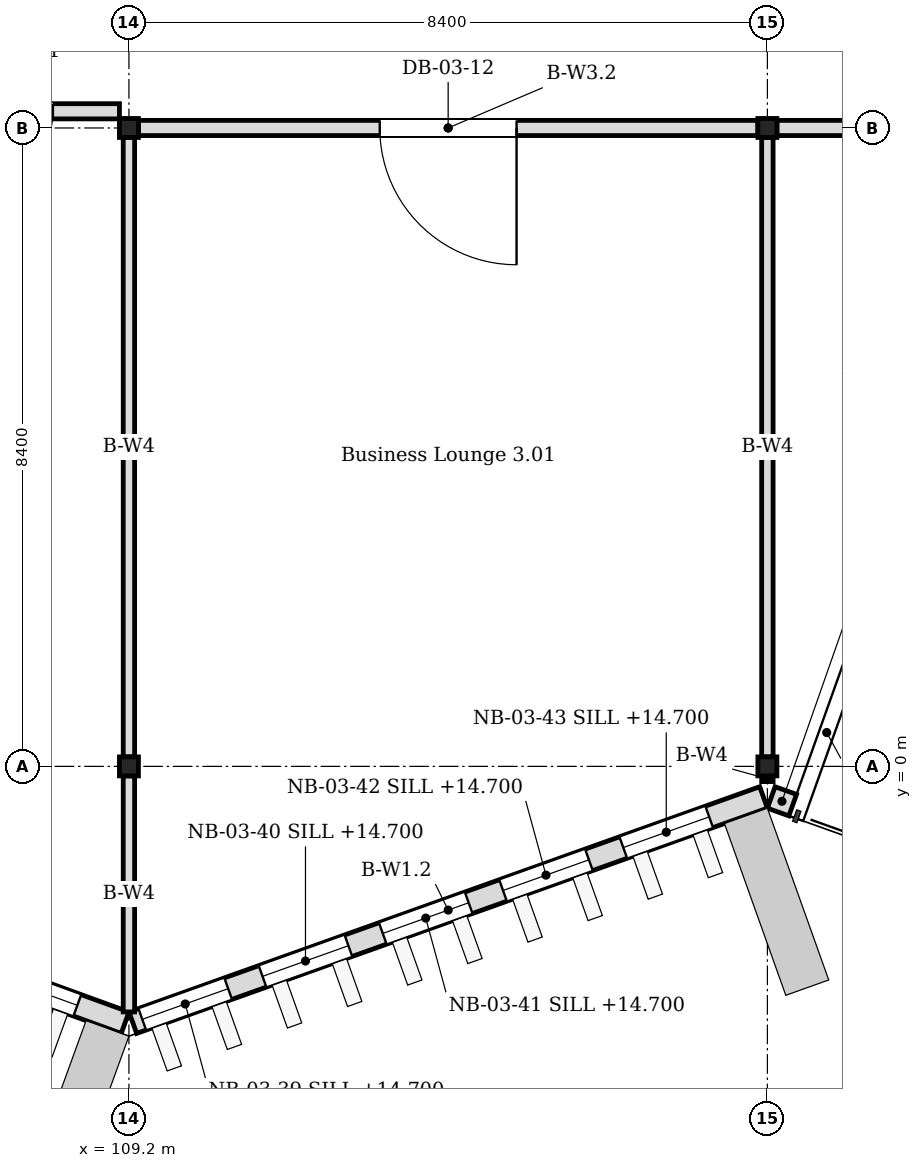
"""IFC4 building model, lengths in metres.
Left out: names, types, materials, properties, quantities, classifications, styles, units other than length and angle.
Written with IfcOpenShell. Run it as: python <this file> out.ifc"""

import sys

from ifc_helpers import new_model, si_unit, direction, frame, frame_2d, origin, origin_2d, place, context, subcontext, project, spatial, rectangle, i_section, extrude, element, fill, save


model = new_model("IFC4")
c1 = context("Model", 3, precision=1e-05, world=origin(), true_north=direction((0.0, 1.0)))
c2 = subcontext(c1, "Body", "Model", "MODEL_VIEW")
j1 = project(units=[si_unit("LENGTHUNIT", "METRE"), si_unit("PLANEANGLEUNIT", "RADIAN")], contexts=[c1])
p1 = place(None, origin())
s1 = spatial("IfcSite", under=j1, at=p1, CompositionType="ELEMENT")
p2 = place(p1, origin())
s2 = spatial("IfcBuilding", under=s1, at=p2, CompositionType="ELEMENT")
p3 = place(p2, frame((0.0, 0.0, 14.4)))
s3 = spatial("IfcBuildingStorey", under=s2, at=p3, CompositionType="ELEMENT", Elevation=14.4)
for number, where, z_axis, x_axis in (
    (1, (109.2, 0.0, 0.0), (0.0, 0.0, 1.0), (1.0, 0.0, 0.0)),
    (2, (109.2, 8.4, 0.0), (0.0, 0.0, 1.0), (1.0, 0.0, 0.0)),
    (3, (117.6, 0.0, 0.0), (0.0, 0.0, 1.0), (1.0, 0.0, 0.0)),
    (4, (117.6, 8.4, 0.0), (0.0, 0.0, 1.0), (1.0, 0.0, 0.0)),
):
    element("IfcColumn", number, at=place(p3, frame(where, z_axis=z_axis, x_axis=x_axis)), inside=s3, PredefinedType="COLUMN", context=c2, shape_type="SweptSolid", body=[
        extrude(i_section(OverallWidth=0.25, OverallDepth=0.25, WebThickness=0.009, FlangeThickness=0.014, FilletRadius=0.013, at=origin_2d()), origin(), (0.0, 0.0, 1.0), 3.95),
    ])
p4 = place(p3, frame((100.851, -0.359, 0.0), z_axis=(0.0, 0.0, 1.0), x_axis=(0.939953187971, -0.341303390584, 0.0)))
e5 = element("IfcWall", 5, at=p4, inside=s3, PredefinedType="SOLIDWALL", context=c2, shape_type="SweptSolid", body=[
    extrude(rectangle(XDim=8.828, YDim=0.3, at=frame_2d((4.414, 0.0))), origin(), (0.0, 0.0, 1.0), 3.95),
])
p5 = place(p4, frame((0.24, 0.0, 0.3)))
e6 = element("IfcOpeningElement", 6, at=p5, cuts=e5, PredefinedType="OPENING", context=c2, shape_type="SweptSolid", body=[
    extrude(rectangle(XDim=1.2, YDim=3.3, at=frame_2d((0.6, 1.65))), frame((0.0, 0.16, 0.0), z_axis=(0.0, -1.0, 0.0), x_axis=(1.0, 0.0, 0.0)), (0.0, 0.0, 1.0), 0.32),
])
p6 = place(p4, frame((1.92, 0.0, 0.3)))
e7 = element("IfcOpeningElement", 7, at=p6, cuts=e5, PredefinedType="OPENING", context=c2, shape_type="SweptSolid", body=[
    extrude(rectangle(XDim=1.2, YDim=3.3, at=frame_2d((0.6, 1.65))), frame((0.0, 0.16, 0.0), z_axis=(0.0, -1.0, 0.0), x_axis=(1.0, 0.0, 0.0)), (0.0, 0.0, 1.0), 0.32),
])
p7 = place(p4, frame((3.6, 0.0, 0.3)))
e8 = element("IfcOpeningElement", 8, at=p7, cuts=e5, PredefinedType="OPENING", context=c2, shape_type="SweptSolid", body=[
    extrude(rectangle(XDim=1.2, YDim=3.3, at=frame_2d((0.6, 1.65))), frame((0.0, 0.16, 0.0), z_axis=(0.0, -1.0, 0.0), x_axis=(1.0, 0.0, 0.0)), (0.0, 0.0, 1.0), 0.32),
])
p8 = place(p4, frame((5.28, 0.0, 0.3)))
e9 = element("IfcOpeningElement", 9, at=p8, cuts=e5, PredefinedType="OPENING", context=c2, shape_type="SweptSolid", body=[
    extrude(rectangle(XDim=1.2, YDim=3.3, at=frame_2d((0.6, 1.65))), frame((0.0, 0.16, 0.0), z_axis=(0.0, -1.0, 0.0), x_axis=(1.0, 0.0, 0.0)), (0.0, 0.0, 1.0), 0.32),
])
p9 = place(p4, frame((6.96, 0.0, 0.3)))
e10 = element("IfcOpeningElement", 10, at=p9, cuts=e5, PredefinedType="OPENING", context=c2, shape_type="SweptSolid", body=[
    extrude(rectangle(XDim=1.2, YDim=3.3, at=frame_2d((0.6, 1.65))), frame((0.0, 0.16, 0.0), z_axis=(0.0, -1.0, 0.0), x_axis=(1.0, 0.0, 0.0)), (0.0, 0.0, 1.0), 0.32),
])
p10 = place(p3, frame((109.251, -3.372, 0.0), z_axis=(0.0, 0.0, 1.0), x_axis=(0.941744418946, 0.336329376334, 0.0)))
e11 = element("IfcWall", 11, at=p10, inside=s3, PredefinedType="SOLIDWALL", context=c2, shape_type="SweptSolid", body=[
    extrude(rectangle(XDim=8.812, YDim=0.3, at=frame_2d((4.406, 0.0))), origin(), (0.0, 0.0, 1.0), 3.95),
])
p11 = place(p10, frame((0.132, 0.0, 0.3)))
e12 = element("IfcOpeningElement", 12, at=p11, cuts=e11, PredefinedType="OPENING", context=c2, shape_type="SweptSolid", body=[
    extrude(rectangle(XDim=1.2, YDim=3.3, at=frame_2d((0.6, 1.65))), frame((0.0, 0.16, 0.0), z_axis=(0.0, -1.0, 0.0), x_axis=(1.0, 0.0, 0.0)), (0.0, 0.0, 1.0), 0.32),
])
p12 = place(p10, frame((1.812, 0.0, 0.3)))
e13 = element("IfcOpeningElement", 13, at=p12, cuts=e11, PredefinedType="OPENING", context=c2, shape_type="SweptSolid", body=[
    extrude(rectangle(XDim=1.2, YDim=3.3, at=frame_2d((0.6, 1.65))), frame((0.0, 0.16, 0.0), z_axis=(0.0, -1.0, 0.0), x_axis=(1.0, 0.0, 0.0)), (0.0, 0.0, 1.0), 0.32),
])
p13 = place(p10, frame((3.492, 0.0, 0.3)))
e14 = element("IfcOpeningElement", 14, at=p13, cuts=e11, PredefinedType="OPENING", context=c2, shape_type="SweptSolid", body=[
    extrude(rectangle(XDim=1.2, YDim=3.3, at=frame_2d((0.6, 1.65))), frame((0.0, 0.16, 0.0), z_axis=(0.0, -1.0, 0.0), x_axis=(1.0, 0.0, 0.0)), (0.0, 0.0, 1.0), 0.32),
])
p14 = place(p10, frame((5.172, 0.0, 0.3)))
e15 = element("IfcOpeningElement", 15, at=p14, cuts=e11, PredefinedType="OPENING", context=c2, shape_type="SweptSolid", body=[
    extrude(rectangle(XDim=1.2, YDim=3.3, at=frame_2d((0.6, 1.65))), frame((0.0, 0.16, 0.0), z_axis=(0.0, -1.0, 0.0), x_axis=(1.0, 0.0, 0.0)), (0.0, 0.0, 1.0), 0.32),
])
p15 = place(p10, frame((6.852, 0.0, 0.3)))
e16 = element("IfcOpeningElement", 16, at=p15, cuts=e11, PredefinedType="OPENING", context=c2, shape_type="SweptSolid", body=[
    extrude(rectangle(XDim=1.2, YDim=3.3, at=frame_2d((0.6, 1.65))), frame((0.0, 0.16, 0.0), z_axis=(0.0, -1.0, 0.0), x_axis=(1.0, 0.0, 0.0)), (0.0, 0.0, 1.0), 0.32),
])
p16 = place(p3, frame((117.65, -0.409, 0.0), z_axis=(0.0, 0.0, 1.0), x_axis=(0.941889038699, -0.335924156289, 0.0)))
e17 = element("IfcWall", 17, at=p16, inside=s3, PredefinedType="SOLIDWALL", context=c2, shape_type="SweptSolid", body=[
    extrude(rectangle(XDim=0.3, YDim=0.3, at=frame_2d((0.15, 0.0))), origin(), (0.0, 0.0, 1.0), 3.95),
])
p17 = place(p3, frame((100.925, 8.619, 0.0), z_axis=(0.0, 0.0, 1.0), x_axis=(1.0, 0.0, 0.0)))
e18 = element("IfcWall", 18, at=p17, inside=s3, PredefinedType="PARTITIONING", context=c2, shape_type="SweptSolid", body=[
    extrude(rectangle(XDim=8.15, YDim=0.2, at=frame_2d((4.075, 0.0))), origin(), (0.0, 0.0, 1.0), 3.25),
])
p18 = place(p17, frame((6.275, 0.0, 0.0)))
e19 = element("IfcOpeningElement", 19, at=p18, cuts=e18, PredefinedType="OPENING", context=c2, shape_type="SweptSolid", body=[
    extrude(rectangle(XDim=1.0, YDim=2.1, at=frame_2d((0.5, 1.05))), frame((0.0, 0.11, 0.0), z_axis=(0.0, -1.0, 0.0), x_axis=(1.0, 0.0, 0.0)), (0.0, 0.0, 1.0), 0.22),
])
p19 = place(p3, frame((109.325, 8.4, 0.0), z_axis=(0.0, 0.0, 1.0), x_axis=(1.0, 0.0, 0.0)))
e20 = element("IfcWall", 20, at=p19, inside=s3, PredefinedType="PARTITIONING", context=c2, shape_type="SweptSolid", body=[
    extrude(rectangle(XDim=8.15, YDim=0.2, at=frame_2d((4.075, 0.0))), origin(), (0.0, 0.0, 1.0), 3.25),
])
p20 = place(p19, frame((3.175, 0.0, 0.0)))
e21 = element("IfcOpeningElement", 21, at=p20, cuts=e20, PredefinedType="OPENING", context=c2, shape_type="SweptSolid", body=[
    extrude(rectangle(XDim=1.8, YDim=2.1, at=frame_2d((0.9, 1.05))), frame((0.0, 0.11, 0.0), z_axis=(0.0, -1.0, 0.0), x_axis=(1.0, 0.0, 0.0)), (0.0, 0.0, 1.0), 0.22),
])
p21 = place(p3, frame((117.725, 8.4, 0.0), z_axis=(0.0, 0.0, 1.0), x_axis=(1.0, 0.0, 0.0)))
e22 = element("IfcWall", 22, at=p21, inside=s3, PredefinedType="PARTITIONING", context=c2, shape_type="SweptSolid", body=[
    extrude(rectangle(XDim=8.15, YDim=0.2, at=frame_2d((4.075, 0.0))), origin(), (0.0, 0.0, 1.0), 3.25),
])
p22 = place(p21, frame((2.875, 0.0, 0.0)))
e23 = element("IfcOpeningElement", 23, at=p22, cuts=e22, PredefinedType="OPENING", context=c2, shape_type="SweptSolid", body=[
    extrude(rectangle(XDim=2.4, YDim=2.2, at=frame_2d((1.2, 1.1))), frame((0.0, 0.11, 0.0), z_axis=(0.0, -1.0, 0.0), x_axis=(1.0, 0.0, 0.0)), (0.0, 0.0, 1.0), 0.22),
])
p23 = place(p3, frame((109.2, -3.231, 0.0), z_axis=(0.0, 0.0, 1.0), x_axis=(0.0, 1.0, 0.0)))
e24 = element("IfcWall", 24, at=p23, inside=s3, PredefinedType="PARTITIONING", context=c2, shape_type="SweptSolid", body=[
    extrude(rectangle(XDim=3.106, YDim=0.15, at=frame_2d((1.553, 0.0))), origin(), (0.0, 0.0, 1.0), 3.25),
])
p24 = place(p3, frame((109.2, 0.125, 0.0), z_axis=(0.0, 0.0, 1.0), x_axis=(0.0, 1.0, 0.0)))
e25 = element("IfcWall", 25, at=p24, inside=s3, PredefinedType="PARTITIONING", context=c2, shape_type="SweptSolid", body=[
    extrude(rectangle(XDim=8.15, YDim=0.15, at=frame_2d((4.075, 0.0))), origin(), (0.0, 0.0, 1.0), 3.25),
])
p25 = place(p3, frame((117.6, -0.2, 0.0), z_axis=(0.0, 0.0, 1.0), x_axis=(0.0, 1.0, 0.0)))
e26 = element("IfcWall", 26, at=p25, inside=s3, PredefinedType="PARTITIONING", context=c2, shape_type="SweptSolid", body=[
    extrude(rectangle(XDim=0.075, YDim=0.15, at=frame_2d((0.038, 0.0))), origin(), (0.0, 0.0, 1.0), 3.25),
])
p26 = place(p3, frame((117.6, 0.125, 0.0), z_axis=(0.0, 0.0, 1.0), x_axis=(0.0, 1.0, 0.0)))
e27 = element("IfcWall", 27, at=p26, inside=s3, PredefinedType="PARTITIONING", context=c2, shape_type="SweptSolid", body=[
    extrude(rectangle(XDim=8.15, YDim=0.15, at=frame_2d((4.075, 0.0))), origin(), (0.0, 0.0, 1.0), 3.25),
])
p27 = place(p9, origin())
e28 = element("IfcWindow", 28, at=p27, inside=s3, PartitioningType="TRIPLE_PANEL_VERTICAL", PredefinedType="WINDOW", context=c2, shape_type="SweptSolid", body=[
    extrude(rectangle(XDim=1.2, YDim=3.3, at=frame_2d((0.6, 1.65))), frame((0.0, 0.03, 0.0), z_axis=(0.0, -1.0, 0.0), x_axis=(1.0, 0.0, 0.0)), (0.0, 0.0, 1.0), 0.06),
])
fill(e10, e28)
p28 = place(p11, origin())
e29 = element("IfcWindow", 29, at=p28, inside=s3, PartitioningType="TRIPLE_PANEL_VERTICAL", PredefinedType="WINDOW", context=c2, shape_type="SweptSolid", body=[
    extrude(rectangle(XDim=1.2, YDim=3.3, at=frame_2d((0.6, 1.65))), frame((0.0, 0.03, 0.0), z_axis=(0.0, -1.0, 0.0), x_axis=(1.0, 0.0, 0.0)), (0.0, 0.0, 1.0), 0.06),
])
fill(e12, e29)
p29 = place(p12, origin())
e30 = element("IfcWindow", 30, at=p29, inside=s3, PartitioningType="TRIPLE_PANEL_VERTICAL", PredefinedType="WINDOW", context=c2, shape_type="SweptSolid", body=[
    extrude(rectangle(XDim=1.2, YDim=3.3, at=frame_2d((0.6, 1.65))), frame((0.0, 0.03, 0.0), z_axis=(0.0, -1.0, 0.0), x_axis=(1.0, 0.0, 0.0)), (0.0, 0.0, 1.0), 0.06),
])
fill(e13, e30)
p30 = place(p13, origin())
e31 = element("IfcWindow", 31, at=p30, inside=s3, PartitioningType="TRIPLE_PANEL_VERTICAL", PredefinedType="WINDOW", context=c2, shape_type="SweptSolid", body=[
    extrude(rectangle(XDim=1.2, YDim=3.3, at=frame_2d((0.6, 1.65))), frame((0.0, 0.03, 0.0), z_axis=(0.0, -1.0, 0.0), x_axis=(1.0, 0.0, 0.0)), (0.0, 0.0, 1.0), 0.06),
])
fill(e14, e31)
p31 = place(p14, origin())
e32 = element("IfcWindow", 32, at=p31, inside=s3, PartitioningType="TRIPLE_PANEL_VERTICAL", PredefinedType="WINDOW", context=c2, shape_type="SweptSolid", body=[
    extrude(rectangle(XDim=1.2, YDim=3.3, at=frame_2d((0.6, 1.65))), frame((0.0, 0.03, 0.0), z_axis=(0.0, -1.0, 0.0), x_axis=(1.0, 0.0, 0.0)), (0.0, 0.0, 1.0), 0.06),
])
fill(e15, e32)
p32 = place(p15, origin())
e33 = element("IfcWindow", 33, at=p32, inside=s3, PartitioningType="TRIPLE_PANEL_VERTICAL", PredefinedType="WINDOW", context=c2, shape_type="SweptSolid", body=[
    extrude(rectangle(XDim=1.2, YDim=3.3, at=frame_2d((0.6, 1.65))), frame((0.0, 0.03, 0.0), z_axis=(0.0, -1.0, 0.0), x_axis=(1.0, 0.0, 0.0)), (0.0, 0.0, 1.0), 0.06),
])
fill(e16, e33)
p33 = place(p20, origin())
e34 = element("IfcDoor", 34, at=p33, inside=s3, OperationType="DOUBLE_DOOR_SINGLE_SWING", PredefinedType="DOOR", context=c2, shape_type="SweptSolid", body=[
    extrude(rectangle(XDim=1.8, YDim=2.1, at=frame_2d((0.9, 1.05))), frame((0.0, 0.025, 0.0), z_axis=(0.0, -1.0, 0.0), x_axis=(1.0, 0.0, 0.0)), (0.0, 0.0, 1.0), 0.05),
])
fill(e21, e34)
save(model, sys.argv[1])
